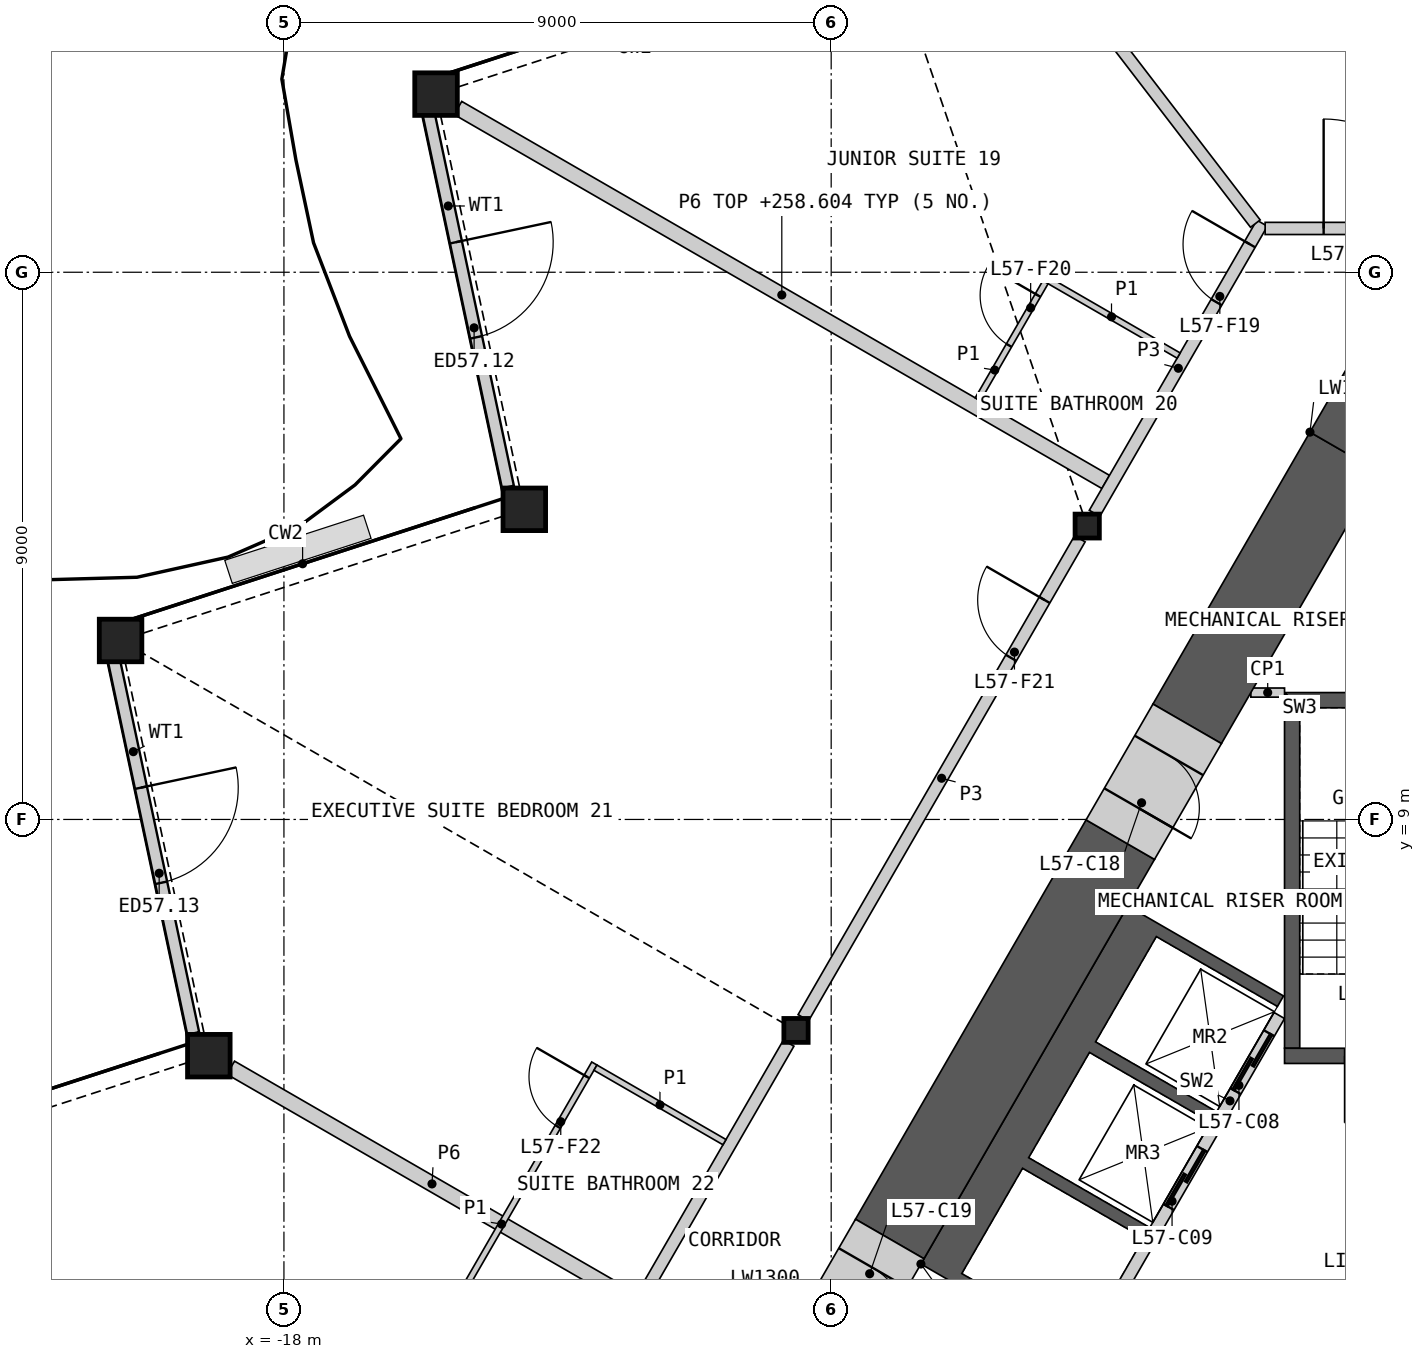
"""IFC4 building model, lengths in metres.
Left out: names, types, materials, properties, quantities, classifications, styles, units other than length and angle.
Written with IfcOpenShell. Run it as: python <this file> out.ifc"""

import sys

from ifc_helpers import new_model, si_unit, direction, frame, frame_2d, origin, origin_2d, place, context, subcontext, project, spatial, polyline, rectangle, hollow_rectangle, i_section, outline, extrude, element, fill, save


model = new_model("IFC4")
c1 = context("Model", 3, precision=1e-05, world=origin(), true_north=direction((0.0, 1.0)))
c2 = subcontext(c1, "Body", "Model", "MODEL_VIEW")
j1 = project(units=[si_unit("LENGTHUNIT", "METRE"), si_unit("PLANEANGLEUNIT", "RADIAN")], contexts=[c1])
p1 = place(None, origin())
s1 = spatial("IfcSite", under=j1, at=p1, CompositionType="ELEMENT")
p2 = place(p1, origin())
s2 = spatial("IfcBuilding", under=s1, at=p2, CompositionType="ELEMENT")
p3 = place(p2, frame((0.0, 0.0, 256.2)))
s3 = spatial("IfcBuildingStorey", under=s2, at=p3, CompositionType="ELEMENT", Elevation=256.2)
for number, where, z_axis, x_axis in (
    (1, (-15.499, 20.93, 0.0), (0.0, 0.0, 1.0), (1.0, 0.0, 0.0)),
    (2, (-14.047, 14.101, 0.0), (0.0, 0.0, 1.0), (1.0, 0.0, 0.0)),
    (3, (-20.687, 11.943, 0.0), (0.0, 0.0, 1.0), (1.0, 0.0, 0.0)),
    (4, (-19.235, 5.115, 0.0), (0.0, 0.0, 1.0), (1.0, 0.0, 0.0)),
):
    element("IfcColumn", number, at=place(p3, frame(where, z_axis=z_axis, x_axis=x_axis)), inside=s3, PredefinedType="COLUMN", context=c2, shape_type="SweptSolid", body=[
        extrude(hollow_rectangle(XDim=0.7, YDim=0.7, WallThickness=0.045, at=origin_2d()), origin(), (0.0, 0.0, 1.0), 3.6),
    ])
for number, where, z_axis, x_axis in (
    (5, (-4.789, 13.825, 0.0), (0.0, 0.0, 1.0), (1.0, 0.0, 0.0)),
    (6, (-9.578, 5.53, 0.0), (0.0, 0.0, 1.0), (1.0, 0.0, 0.0)),
):
    element("IfcColumn", number, at=place(p3, frame(where, z_axis=z_axis, x_axis=x_axis)), inside=s3, PredefinedType="COLUMN", context=c2, shape_type="SweptSolid", body=[
        extrude(i_section(OverallWidth=0.399, OverallDepth=0.393, WebThickness=0.023, FlangeThickness=0.037, at=origin_2d()), origin(), (0.0, 0.0, 1.0), 3.6),
    ])
p4 = place(p3, frame((-15.626, 20.631, 0.0), z_axis=(0.0, 0.0, 1.0), x_axis=(0.207882853761, -0.978153729795, 0.0)))
e7 = element("IfcWall", 7, at=p4, inside=s3, PredefinedType="SOLIDWALL", context=c2, shape_type="SweptSolid", body=[
    extrude(rectangle(XDim=6.301, YDim=0.2, at=frame_2d((3.15, 0.0))), origin(), (0.0, 0.0, 1.0), 2.701),
])
p5 = place(p4, frame((2.184, 0.0, 0.0)))
e8 = element("IfcOpeningElement", 8, at=p5, cuts=e7, PredefinedType="OPENING", context=c2, shape_type="SweptSolid", body=[
    extrude(rectangle(XDim=1.6, YDim=2.4, at=frame_2d((0.8, 1.2))), frame((0.0, 0.11, 0.0), z_axis=(0.0, -1.0, 0.0), x_axis=(1.0, 0.0, 0.0)), (0.0, 0.0, 1.0), 0.22),
])
p6 = place(p3, frame((-20.805, 11.659, 0.0), z_axis=(0.0, 0.0, 1.0), x_axis=(0.207913305093, -0.978147257608, 0.0)))
e9 = element("IfcWall", 9, at=p6, inside=s3, PredefinedType="SOLIDWALL", context=c2, shape_type="SweptSolid", body=[
    extrude(rectangle(XDim=6.316, YDim=0.2, at=frame_2d((3.158, 0.0))), origin(), (0.0, 0.0, 1.0), 2.701),
])
p7 = place(p6, frame((2.184, 0.0, 0.0)))
e10 = element("IfcOpeningElement", 10, at=p7, cuts=e9, PredefinedType="OPENING", context=c2, shape_type="SweptSolid", body=[
    extrude(rectangle(XDim=1.6, YDim=2.4, at=frame_2d((0.8, 1.2))), frame((0.0, 0.11, 0.0), z_axis=(0.0, -1.0, 0.0), x_axis=(1.0, 0.0, 0.0)), (0.0, 0.0, 1.0), 0.22),
])
p8 = place(p3, origin())
e11 = element("IfcWall", 11, at=p8, inside=s3, PredefinedType="SHEAR", context=c2, shape_type="SweptSolid", body=[
    extrude(outline(polyline([(-7.524, 1.688), (-4.124, 7.577), (-3.731, 7.35), (-1.561, 6.097), (-1.66, 5.924), (-3.652, 7.074), (-4.652, 5.342), (-2.66, 4.192), (-2.76, 4.019), (-4.752, 5.169), (-5.752, 3.437), (-3.76, 2.287), (-3.861, 2.113), (-5.852, 3.263), (-6.852, 1.531), (-4.861, 0.381), (-4.96, 0.208), (-7.131, 1.461), (-7.524, 1.688)])), origin(), (0.0, 0.0, 1.0), 3.25),
])
p9 = place(p3, frame((-1.631, 5.776, 0.0), z_axis=(0.0, 0.0, 1.0), x_axis=(-0.499992876559, -0.866029516466, 0.0)))
e12 = element("IfcWall", 12, at=p9, inside=s3, PredefinedType="SOLIDWALL", context=c2, shape_type="SweptSolid", body=[
    extrude(rectangle(XDim=6.486, YDim=0.2, at=frame_2d((3.243, 0.0))), origin(), (0.0, 0.0, 1.0), 3.25),
])
p10 = place(p9, frame((0.337, 0.0, 0.0)))
e13 = element("IfcOpeningElement", 13, at=p10, cuts=e12, PredefinedType="OPENING", context=c2, shape_type="SweptSolid", body=[
    extrude(rectangle(XDim=1.1, YDim=2.1, at=frame_2d((0.55, 1.05))), frame((0.0, 0.11, 0.0), z_axis=(0.0, -1.0, 0.0), x_axis=(1.0, 0.0, 0.0)), (0.0, 0.0, 1.0), 0.22),
])
p11 = place(p9, frame((2.537, 0.0, 0.0)))
e14 = element("IfcOpeningElement", 14, at=p11, cuts=e12, PredefinedType="OPENING", context=c2, shape_type="SweptSolid", body=[
    extrude(rectangle(XDim=1.1, YDim=2.1, at=frame_2d((0.55, 1.05))), frame((0.0, 0.11, 0.0), z_axis=(0.0, -1.0, 0.0), x_axis=(1.0, 0.0, 0.0)), (0.0, 0.0, 1.0), 0.22),
])
p12 = place(p3, origin())
e15 = element("IfcWall", 15, at=p12, inside=s3, PredefinedType="SHEAR", context=c2, shape_type="SweptSolid", body=[
    extrude(outline(polyline([(1.544, 11.087), (-1.544, 11.087), (-1.294, 10.837), (1.294, 10.837), (1.544, 11.087)])), origin(), (0.0, 0.0, 1.0), 3.25),
])
p13 = place(p3, origin())
e16 = element("IfcWall", 16, at=p13, inside=s3, PredefinedType="SHEAR", context=c2, shape_type="SweptSolid", body=[
    extrude(outline(polyline([(-1.294, 10.837), (-1.544, 11.087), (-1.544, 5.237), (-1.294, 5.237), (-1.294, 10.837)])), origin(), (0.0, 0.0, 1.0), 3.25),
])
p14 = place(p3, frame((1.544, 5.112, 0.0), z_axis=(0.0, 0.0, 1.0), x_axis=(-1.0, 0.0, 0.0)))
e17 = element("IfcWall", 17, at=p14, inside=s3, PredefinedType="SHEAR", context=c2, shape_type="SweptSolid", body=[
    extrude(rectangle(XDim=3.088, YDim=0.25, at=frame_2d((1.544, 0.0))), origin(), (0.0, 0.0, 1.0), 3.25),
])
p15 = place(p14, frame((0.994, 0.0, 0.0)))
e18 = element("IfcOpeningElement", 18, at=p15, cuts=e17, PredefinedType="OPENING", context=c2, shape_type="SweptSolid", body=[
    extrude(rectangle(XDim=1.1, YDim=2.1, at=frame_2d((0.55, 1.05))), frame((0.0, 0.135, 0.0), z_axis=(0.0, -1.0, 0.0), x_axis=(1.0, 0.0, 0.0)), (0.0, 0.0, 1.0), 0.27),
])
p16 = place(p3, frame((-1.544, 11.087, 0.0), z_axis=(0.0, 0.0, 1.0), x_axis=(-1.0, 0.0, 0.0)))
e19 = element("IfcWall", 19, at=p16, inside=s3, PredefinedType="PARTITIONING", context=c2, shape_type="SweptSolid", body=[
    extrude(rectangle(XDim=0.554, YDim=0.15, at=frame_2d((0.277, 0.0))), origin(), (0.0, 0.0, 1.0), 3.25),
])
p17 = place(p3, frame((-4.245, 8.668, 0.0), z_axis=(0.0, 0.0, 1.0), x_axis=(-0.500002971097, -0.866023688414, 0.0)))
e20 = element("IfcWall", 20, at=p17, inside=s3, PredefinedType="SHEAR", context=c2, shape_type="SweptSolid", body=[
    extrude(rectangle(XDim=7.584, YDim=1.3, at=frame_2d((3.792, 0.0))), origin(), (0.0, 0.0, 1.0), 3.25),
])
p18 = place(p3, frame((-0.563, 15.045, 0.0), z_axis=(0.0, 0.0, 1.0), x_axis=(-0.499982995661, -0.866035221021, 0.0)))
e21 = element("IfcWall", 21, at=p18, inside=s3, PredefinedType="SHEAR", context=c2, shape_type="SweptSolid", body=[
    extrude(rectangle(XDim=5.164, YDim=1.3, at=frame_2d((2.582, 0.0))), origin(), (0.0, 0.0, 1.0), 3.25),
])
p19 = place(p3, origin())
e22 = element("IfcWall", 22, at=p19, inside=s3, PredefinedType="SHEAR", context=c2, shape_type="SweptSolid", body=[
    extrude(outline(polyline([(-1.126, 15.371), (0.0, 17.321), (1.126, 15.371), (0.0, 14.72), (-1.126, 15.371)])), origin(), (0.0, 0.0, 1.0), 3.25),
])
p20 = place(p3, frame((-3.145, 10.573, 0.0), z_axis=(0.0, 0.0, 1.0), x_axis=(-0.50002983664, -0.866008176907, 0.0)))
e23 = element("IfcWall", 23, at=p20, inside=s3, PredefinedType="SHEAR", context=c2, shape_type="SweptSolid", body=[
    extrude(rectangle(XDim=2.2, YDim=1.3, at=frame_2d((1.1, 0.0))), origin(), (0.0, 0.0, 1.0), 3.25),
])
p21 = place(p20, frame((0.6, 0.0, 0.0)))
e24 = element("IfcOpeningElement", 24, at=p21, cuts=e23, PredefinedType="OPENING", context=c2, shape_type="SweptSolid", body=[
    extrude(rectangle(XDim=1.0, YDim=2.1, at=frame_2d((0.5, 1.05))), frame((0.0, 0.66, 0.0), z_axis=(0.0, -1.0, 0.0), x_axis=(1.0, 0.0, 0.0)), (0.0, 0.0, 1.0), 1.32),
])
p22 = place(p3, frame((-8.037, 2.1, 0.0), z_axis=(0.0, 0.0, 1.0), x_axis=(-0.50002983664, -0.866008176907, 0.0)))
e25 = element("IfcWall", 25, at=p22, inside=s3, PredefinedType="SHEAR", context=c2, shape_type="SweptSolid", body=[
    extrude(rectangle(XDim=2.2, YDim=1.3, at=frame_2d((1.1, 0.0))), origin(), (0.0, 0.0, 1.0), 3.25),
])
p23 = place(p22, frame((0.55, 0.0, 0.0)))
e26 = element("IfcOpeningElement", 26, at=p23, cuts=e25, PredefinedType="OPENING", context=c2, shape_type="SweptSolid", body=[
    extrude(rectangle(XDim=1.1, YDim=2.1, at=frame_2d((0.55, 1.05))), frame((0.0, 0.66, 0.0), z_axis=(0.0, -1.0, 0.0), x_axis=(1.0, 0.0, 0.0)), (0.0, 0.0, 1.0), 1.32),
])
p24 = place(p3, frame((-15.138, 20.702, 0.0), z_axis=(0.0, 0.0, 1.0), x_axis=(0.86602627735, -0.499998486937, 0.0)))
e27 = element("IfcWall", 27, at=p24, inside=s3, PredefinedType="PARTITIONING", context=c2, shape_type="SweptSolid", body=[
    extrude(rectangle(XDim=12.301, YDim=0.25, at=frame_2d((6.15, 0.0))), origin(), (0.0, 0.0, 1.0), 2.404),
])
p25 = place(p3, frame((-14.247, -2.556, 0.0), z_axis=(0.0, 0.0, 1.0), x_axis=(0.49998193945, 0.866035830797, 0.0)))
e28 = element("IfcWall", 28, at=p25, inside=s3, PredefinedType="PARTITIONING", context=c2, shape_type="SweptSolid", body=[
    extrude(rectangle(XDim=9.094, YDim=0.2, at=frame_2d((4.547, 0.0))), origin(), (0.0, 0.0, 1.0), 3.25),
])
p26 = place(p3, frame((-9.458, 5.74, 0.0), z_axis=(0.0, 0.0, 1.0), x_axis=(0.50000207303, 0.866024206917, 0.0)))
e29 = element("IfcWall", 29, at=p26, inside=s3, PredefinedType="PARTITIONING", context=c2, shape_type="SweptSolid", body=[
    extrude(rectangle(XDim=9.095, YDim=0.2, at=frame_2d((4.547, 0.0))), origin(), (0.0, 0.0, 1.0), 3.25),
])
p27 = place(p26, frame((6.833, 0.0, 0.0)))
e30 = element("IfcOpeningElement", 30, at=p27, cuts=e29, PredefinedType="OPENING", context=c2, shape_type="SweptSolid", body=[
    extrude(rectangle(XDim=1.1, YDim=2.1, at=frame_2d((0.55, 1.05))), frame((0.0, 0.11, 0.0), z_axis=(0.0, -1.0, 0.0), x_axis=(1.0, 0.0, 0.0)), (0.0, 0.0, 1.0), 0.22),
])
p28 = place(p3, frame((-18.875, 4.917, 0.0), z_axis=(0.0, 0.0, 1.0), x_axis=(0.866017519557, -0.500013655634, 0.0)))
e31 = element("IfcWall", 31, at=p28, inside=s3, PredefinedType="PARTITIONING", context=c2, shape_type="SweptSolid", body=[
    extrude(rectangle(XDim=7.644, YDim=0.25, at=frame_2d((3.822, 0.0))), origin(), (0.0, 0.0, 1.0), 2.404),
])
p29 = place(p3, frame((-4.668, 14.035, 0.0), z_axis=(0.0, 0.0, 1.0), x_axis=(0.499984524817, 0.866034338201, 0.0)))
e32 = element("IfcWall", 32, at=p29, inside=s3, PredefinedType="PARTITIONING", context=c2, shape_type="SweptSolid", body=[
    extrude(rectangle(XDim=5.51, YDim=0.2, at=frame_2d((2.755, 0.0))), origin(), (0.0, 0.0, 1.0), 3.25),
])
p30 = place(p29, frame((4.01, 0.0, 0.0)))
e33 = element("IfcOpeningElement", 33, at=p30, cuts=e32, PredefinedType="OPENING", context=c2, shape_type="SweptSolid", body=[
    extrude(rectangle(XDim=1.1, YDim=2.1, at=frame_2d((0.55, 1.05))), frame((0.0, 0.11, 0.0), z_axis=(0.0, -1.0, 0.0), x_axis=(1.0, 0.0, 0.0)), (0.0, 0.0, 1.0), 0.22),
])
p31 = place(p3, frame((-1.863, 18.72, 0.0), z_axis=(0.0, 0.0, 1.0), x_axis=(1.0, 0.0, 0.0)))
e34 = element("IfcWall", 34, at=p31, inside=s3, PredefinedType="PARTITIONING", context=c2, shape_type="SweptSolid", body=[
    extrude(rectangle(XDim=3.826, YDim=0.2, at=frame_2d((1.913, 0.0))), origin(), (0.0, 0.0, 1.0), 3.25),
])
p32 = place(p31, frame((0.962, 0.0, 0.0)))
e35 = element("IfcOpeningElement", 35, at=p32, cuts=e34, PredefinedType="OPENING", context=c2, shape_type="SweptSolid", body=[
    extrude(rectangle(XDim=1.8, YDim=2.1, at=frame_2d((0.9, 1.05))), frame((0.0, 0.11, 0.0), z_axis=(0.0, -1.0, 0.0), x_axis=(1.0, 0.0, 0.0)), (0.0, 0.0, 1.0), 0.22),
])
p33 = place(p3, frame((-10.277, 29.556, 0.0), z_axis=(0.0, 0.0, 1.0), x_axis=(0.60876001101, -0.793354428358, 0.0)))
e36 = element("IfcWall", 36, at=p33, inside=s3, PredefinedType="PARTITIONING", context=c2, shape_type="SweptSolid", body=[
    extrude(rectangle(XDim=13.558, YDim=0.2, at=frame_2d((6.779, 0.0))), origin(), (0.0, 0.0, 1.0), 2.404),
])
p34 = place(p3, frame((-15.945, -0.297, 0.0), z_axis=(0.0, 0.0, 1.0), x_axis=(0.499978833458, 0.866037623948, 0.0)))
e37 = element("IfcWall", 37, at=p34, inside=s3, PredefinedType="PARTITIONING", context=c2, shape_type="SweptSolid", body=[
    extrude(rectangle(XDim=6.1, YDim=0.1, at=frame_2d((3.05, 0.0))), origin(), (0.0, 0.0, 1.0), 2.404),
])
p35 = place(p34, frame((4.9, 0.0, 0.0)))
e38 = element("IfcOpeningElement", 38, at=p35, cuts=e37, PredefinedType="OPENING", context=c2, shape_type="SweptSolid", body=[
    extrude(rectangle(XDim=0.95, YDim=2.1, at=frame_2d((0.475, 1.05))), frame((0.0, 0.06, 0.0), z_axis=(0.0, -1.0, 0.0), x_axis=(1.0, 0.0, 0.0)), (0.0, 0.0, 1.0), 0.12),
])
p36 = place(p34, frame((0.25, 0.0, 0.0)))
e39 = element("IfcOpeningElement", 39, at=p36, cuts=e37, PredefinedType="OPENING", context=c2, shape_type="SweptSolid", body=[
    extrude(rectangle(XDim=0.95, YDim=2.1, at=frame_2d((0.475, 1.05))), frame((0.0, 0.06, 0.0), z_axis=(0.0, -1.0, 0.0), x_axis=(1.0, 0.0, 0.0)), (0.0, 0.0, 1.0), 0.12),
])
p37 = place(p3, frame((-12.877, 4.917, 0.0), z_axis=(0.0, 0.0, 1.0), x_axis=(0.866057815567, -0.499943856944, 0.0)))
e40 = element("IfcWall", 40, at=p37, inside=s3, PredefinedType="PARTITIONING", context=c2, shape_type="SweptSolid", body=[
    extrude(rectangle(XDim=2.45, YDim=0.1, at=frame_2d((1.225, 0.0))), origin(), (0.0, 0.0, 1.0), 2.404),
])
p38 = place(p3, frame((-5.494, 17.905, 0.0), z_axis=(0.0, 0.0, 1.0), x_axis=(0.866030925526, -0.499990435942, 0.0)))
e41 = element("IfcWall", 41, at=p38, inside=s3, PredefinedType="PARTITIONING", context=c2, shape_type="SweptSolid", body=[
    extrude(rectangle(XDim=2.55, YDim=0.1, at=frame_2d((1.275, 0.0))), origin(), (0.0, 0.0, 1.0), 2.404),
])
p39 = place(p3, frame((-6.588, 15.909, 0.0), z_axis=(0.0, 0.0, 1.0), x_axis=(0.49999788721, 0.866026623601, 0.0)))
e42 = element("IfcWall", 42, at=p39, inside=s3, PredefinedType="PARTITIONING", context=c2, shape_type="SweptSolid", body=[
    extrude(rectangle(XDim=2.225, YDim=0.1, at=frame_2d((1.113, 0.0))), origin(), (0.0, 0.0, 1.0), 2.404),
])
p40 = place(p39, frame((1.025, 0.0, 0.0)))
e43 = element("IfcOpeningElement", 43, at=p40, cuts=e42, PredefinedType="OPENING", context=c2, shape_type="SweptSolid", body=[
    extrude(rectangle(XDim=0.95, YDim=2.1, at=frame_2d((0.475, 1.05))), frame((0.0, 0.06, 0.0), z_axis=(0.0, -1.0, 0.0), x_axis=(1.0, 0.0, 0.0)), (0.0, 0.0, 1.0), 0.12),
])
p41 = place(p5, origin())
e44 = element("IfcDoor", 44, at=p41, inside=s3, OperationType="DOUBLE_DOOR_SINGLE_SWING", PredefinedType="DOOR", context=c2, shape_type="SweptSolid", body=[
    extrude(rectangle(XDim=1.6, YDim=2.4, at=frame_2d((0.8, 1.2))), frame((0.0, 0.025, 0.0), z_axis=(0.0, -1.0, 0.0), x_axis=(1.0, 0.0, 0.0)), (0.0, 0.0, 1.0), 0.05),
])
fill(e8, e44)
p42 = place(p7, origin())
e45 = element("IfcDoor", 45, at=p42, inside=s3, OperationType="DOUBLE_DOOR_SINGLE_SWING", PredefinedType="DOOR", context=c2, shape_type="SweptSolid", body=[
    extrude(rectangle(XDim=1.6, YDim=2.4, at=frame_2d((0.8, 1.2))), frame((0.0, 0.025, 0.0), z_axis=(0.0, -1.0, 0.0), x_axis=(1.0, 0.0, 0.0)), (0.0, 0.0, 1.0), 0.05),
])
fill(e10, e45)
p43 = place(p10, origin())
e46 = element("IfcDoor", 46, at=p43, inside=s3, OperationType="SLIDING_TO_LEFT", PredefinedType="DOOR", context=c2, shape_type="SweptSolid", body=[
    extrude(rectangle(XDim=1.1, YDim=2.1, at=frame_2d((0.55, 1.05))), frame((0.0, 0.025, 0.0), z_axis=(0.0, -1.0, 0.0), x_axis=(1.0, 0.0, 0.0)), (0.0, 0.0, 1.0), 0.05),
])
fill(e13, e46)
p44 = place(p11, origin())
e47 = element("IfcDoor", 47, at=p44, inside=s3, OperationType="SLIDING_TO_LEFT", PredefinedType="DOOR", context=c2, shape_type="SweptSolid", body=[
    extrude(rectangle(XDim=1.1, YDim=2.1, at=frame_2d((0.55, 1.05))), frame((0.0, 0.025, 0.0), z_axis=(0.0, -1.0, 0.0), x_axis=(1.0, 0.0, 0.0)), (0.0, 0.0, 1.0), 0.05),
])
fill(e14, e47)
p45 = place(p15, origin())
e48 = element("IfcDoor", 48, at=p45, inside=s3, OperationType="SINGLE_SWING_RIGHT", PredefinedType="DOOR", context=c2, shape_type="SweptSolid", body=[
    extrude(rectangle(XDim=1.1, YDim=2.1, at=frame_2d((0.55, 1.05))), frame((0.0, 0.025, 0.0), z_axis=(0.0, -1.0, 0.0), x_axis=(1.0, 0.0, 0.0)), (0.0, 0.0, 1.0), 0.05),
])
fill(e18, e48)
p46 = place(p21, origin())
e49 = element("IfcDoor", 49, at=p46, inside=s3, OperationType="SINGLE_SWING_RIGHT", PredefinedType="DOOR", context=c2, shape_type="SweptSolid", body=[
    extrude(rectangle(XDim=1.0, YDim=2.1, at=frame_2d((0.5, 1.05))), frame((0.0, 0.405, 0.0), z_axis=(0.0, -1.0, 0.0), x_axis=(1.0, 0.0, 0.0)), (0.0, 0.0, 1.0), 0.05),
])
fill(e24, e49)
p47 = place(p32, origin())
e50 = element("IfcDoor", 50, at=p47, inside=s3, OperationType="DOUBLE_DOOR_SINGLE_SWING", PredefinedType="DOOR", context=c2, shape_type="SweptSolid", body=[
    extrude(rectangle(XDim=1.8, YDim=2.1, at=frame_2d((0.9, 1.05))), frame((0.0, 0.025, 0.0), z_axis=(0.0, -1.0, 0.0), x_axis=(1.0, 0.0, 0.0)), (0.0, 0.0, 1.0), 0.05),
])
fill(e35, e50)
p48 = place(p30, origin())
e51 = element("IfcDoor", 51, at=p48, inside=s3, OperationType="SINGLE_SWING_RIGHT", PredefinedType="DOOR", context=c2, shape_type="SweptSolid", body=[
    extrude(rectangle(XDim=1.1, YDim=2.1, at=frame_2d((0.55, 1.05))), frame((0.0, 0.025, 0.0), z_axis=(0.0, -1.0, 0.0), x_axis=(1.0, 0.0, 0.0)), (0.0, 0.0, 1.0), 0.05),
])
fill(e33, e51)
p49 = place(p40, origin())
e52 = element("IfcDoor", 52, at=p49, inside=s3, OperationType="SINGLE_SWING_RIGHT", PredefinedType="DOOR", context=c2, shape_type="SweptSolid", body=[
    extrude(rectangle(XDim=0.95, YDim=2.1, at=frame_2d((0.475, 1.05))), frame((0.0, 0.025, 0.0), z_axis=(0.0, -1.0, 0.0), x_axis=(1.0, 0.0, 0.0)), (0.0, 0.0, 1.0), 0.05),
])
fill(e43, e52)
p50 = place(p27, origin())
e53 = element("IfcDoor", 53, at=p50, inside=s3, OperationType="SINGLE_SWING_RIGHT", PredefinedType="DOOR", context=c2, shape_type="SweptSolid", body=[
    extrude(rectangle(XDim=1.1, YDim=2.1, at=frame_2d((0.55, 1.05))), frame((0.0, 0.025, 0.0), z_axis=(0.0, -1.0, 0.0), x_axis=(1.0, 0.0, 0.0)), (0.0, 0.0, 1.0), 0.05),
])
fill(e30, e53)
p51 = place(p35, origin())
e54 = element("IfcDoor", 54, at=p51, inside=s3, OperationType="SINGLE_SWING_RIGHT", PredefinedType="DOOR", context=c2, shape_type="SweptSolid", body=[
    extrude(rectangle(XDim=0.95, YDim=2.1, at=frame_2d((0.475, 1.05))), frame((0.0, 0.025, 0.0), z_axis=(0.0, -1.0, 0.0), x_axis=(1.0, 0.0, 0.0)), (0.0, 0.0, 1.0), 0.05),
])
fill(e38, e54)
save(model, sys.argv[1])
